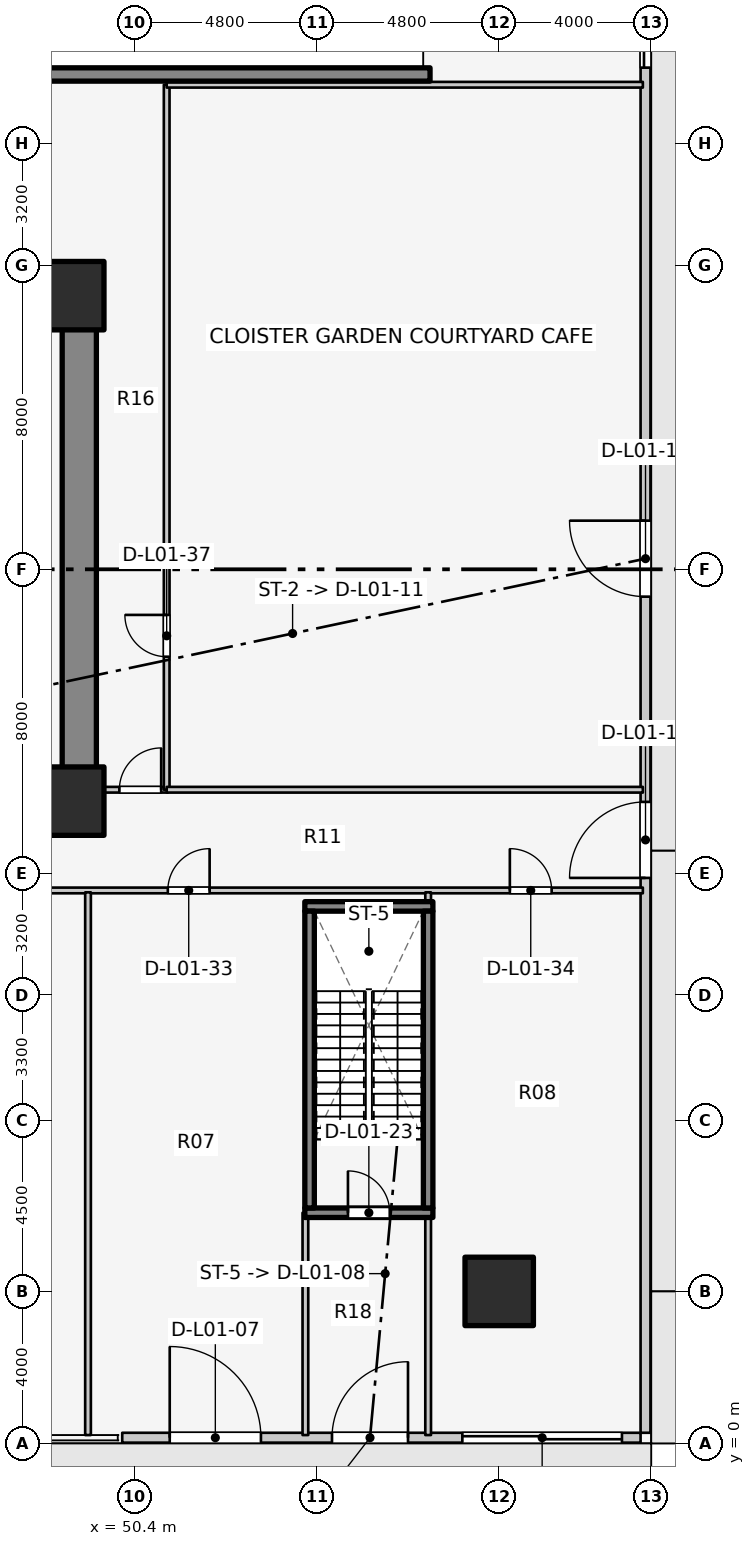
"""IFC4 building model, lengths in metres.
Left out: names, types, materials, properties, quantities, classifications, styles, units other than length and angle.
Written with IfcOpenShell. Run it as: python <this file> out.ifc"""

import sys

from ifc_helpers import new_model, si_unit, direction, frame, frame_2d, origin, origin_2d, place, context, subcontext, project, spatial, rectangle, extrude, element, fill, save


model = new_model("IFC4")
c1 = context("Model", 3, precision=1e-05, world=origin(), true_north=direction((0.0, 1.0)))
c2 = subcontext(c1, "Body", "Model", "MODEL_VIEW")
j1 = project(units=[si_unit("LENGTHUNIT", "METRE"), si_unit("PLANEANGLEUNIT", "RADIAN")], contexts=[c1])
p1 = place(None, origin())
s1 = spatial("IfcSite", under=j1, at=p1, CompositionType="ELEMENT")
p2 = place(p1, origin())
s2 = spatial("IfcBuilding", under=s1, at=p2, CompositionType="ELEMENT")
p3 = place(p2, origin())
s3 = spatial("IfcBuildingStorey", under=s2, at=p3, CompositionType="ELEMENT", Elevation=0.0)
p4 = place(p3, frame((48.95, 17.05, 0.0), z_axis=(0.0, 0.0, 1.0), x_axis=(0.0, 1.0, 0.0)))
e1 = element("IfcWall", 1, at=p4, inside=s3, PredefinedType="SHEAR", context=c2, shape_type="SweptSolid", body=[
    extrude(rectangle(XDim=12.8, YDim=0.9, at=frame_2d((6.4, 0.0))), origin(), (0.0, 0.0, 1.0), 4.6),
])
p5 = place(p3, frame((54.885, 6.07, 0.0), z_axis=(0.0, 0.0, 1.0), x_axis=(1.0, 0.0, 0.0)))
e2 = element("IfcWall", 2, at=p5, inside=s3, PredefinedType="SOLIDWALL", context=c2, shape_type="SweptSolid", body=[
    extrude(rectangle(XDim=3.37, YDim=0.25, at=frame_2d((1.685, 0.0))), origin(), (0.0, 0.0, 1.0), 4.6),
])
p6 = place(p5, frame((1.135, 0.0, 0.0)))
e3 = element("IfcOpeningElement", 3, at=p6, cuts=e2, PredefinedType="OPENING", context=c2, shape_type="SweptSolid", body=[
    extrude(rectangle(XDim=1.1, YDim=2.1, at=frame_2d((0.55, 1.05))), frame((0.0, 0.135, 0.0), z_axis=(0.0, -1.0, 0.0), x_axis=(1.0, 0.0, 0.0)), (0.0, 0.0, 1.0), 0.27),
])
p7 = place(p3, frame((54.885, 14.13, 0.0), z_axis=(0.0, 0.0, 1.0), x_axis=(1.0, 0.0, 0.0)))
e4 = element("IfcWall", 4, at=p7, inside=s3, PredefinedType="SOLIDWALL", context=c2, shape_type="SweptSolid", body=[
    extrude(rectangle(XDim=3.37, YDim=0.25, at=frame_2d((1.685, 0.0))), origin(), (0.0, 0.0, 1.0), 4.6),
])
for number, where, z_axis, x_axis in (
    (5, (55.01, 6.195, 0.0), (0.0, 0.0, 1.0), (0.0, 1.0, 0.0)),
    (6, (58.13, 6.195, 0.0), (0.0, 0.0, 1.0), (0.0, 1.0, 0.0)),
):
    element("IfcWall", number, at=place(p3, frame(where, z_axis=z_axis, x_axis=x_axis)), inside=s3, PredefinedType="SOLIDWALL", context=c2, shape_type="SweptSolid", body=[
        extrude(rectangle(XDim=7.81, YDim=0.25, at=frame_2d((3.905, 0.0))), origin(), (0.0, 0.0, 1.0), 4.6),
    ])
p8 = place(p3, frame((13.65, 36.02, 0.0), z_axis=(0.0, 0.0, 1.0), x_axis=(1.0, 0.0, 0.0)))
e7 = element("IfcWall", 7, at=p8, inside=s3, PredefinedType="SOLIDWALL", context=c2, shape_type="SweptSolid", body=[
    extrude(rectangle(XDim=44.53, YDim=0.35, at=frame_2d((22.265, 0.0))), origin(), (0.0, 0.0, 1.0), 4.6),
])
for number, where, z_axis, x_axis in (
    (8, (48.7, 16.9, 0.0), (0.0, 0.0, 1.0), (1.0, 0.0, 0.0)),
    (9, (48.7, 30.2, 0.0), (0.0, 0.0, 1.0), (1.0, 0.0, 0.0)),
    (10, (60.0, 4.0, 0.0), (0.0, 0.0, 1.0), (1.0, 0.0, 0.0)),
):
    element("IfcColumn", number, at=place(p3, frame(where, z_axis=z_axis, x_axis=x_axis)), inside=s3, PredefinedType="COLUMN", context=c2, shape_type="SweptSolid", body=[
        extrude(rectangle(XDim=1.8, YDim=1.8, at=origin_2d()), origin(), (0.0, 0.0, 1.0), 4.6),
    ])
p9 = place(p3, frame((50.08, 0.15, 0.0), z_axis=(0.0, 0.0, 1.0), x_axis=(1.0, 0.0, 0.0)))
e11 = element("IfcWall", 11, at=p9, inside=s3, PredefinedType="STANDARD", context=c2, shape_type="SweptSolid", body=[
    extrude(rectangle(XDim=13.64, YDim=0.26, at=frame_2d((6.82, 0.0))), origin(), (0.0, 0.0, 1.0), 4.28),
])
p10 = place(p9, frame((1.25, 0.0, 0.0)))
e12 = element("IfcOpeningElement", 12, at=p10, cuts=e11, PredefinedType="OPENING", context=c2, shape_type="SweptSolid", body=[
    extrude(rectangle(XDim=2.4, YDim=2.6, at=frame_2d((1.2, 1.3))), frame((0.0, 0.14, 0.0), z_axis=(0.0, -1.0, 0.0), x_axis=(1.0, 0.0, 0.0)), (0.0, 0.0, 1.0), 0.28),
])
p11 = place(p9, frame((5.52, 0.0, 0.0)))
e13 = element("IfcOpeningElement", 13, at=p11, cuts=e11, PredefinedType="OPENING", context=c2, shape_type="SweptSolid", body=[
    extrude(rectangle(XDim=2.0, YDim=2.4, at=frame_2d((1.0, 1.2))), frame((0.0, 0.14, 0.0), z_axis=(0.0, -1.0, 0.0), x_axis=(1.0, 0.0, 0.0)), (0.0, 0.0, 1.0), 0.28),
])
p12 = place(p9, frame((8.95, 0.0, 0.0)))
e14 = element("IfcOpeningElement", 14, at=p12, cuts=e11, PredefinedType="OPENING", context=c2, shape_type="SweptSolid", body=[
    extrude(rectangle(XDim=4.2, YDim=3.0, at=frame_2d((2.1, 1.5))), frame((0.0, 0.14, 0.0), z_axis=(0.0, -1.0, 0.0), x_axis=(1.0, 0.0, 0.0)), (0.0, 0.0, 1.0), 0.28),
])
p13 = place(p3, frame((63.85, 0.28, 0.0), z_axis=(0.0, 0.0, 1.0), x_axis=(0.0, 1.0, 0.0)))
e15 = element("IfcWall", 15, at=p13, inside=s3, PredefinedType="STANDARD", context=c2, shape_type="SweptSolid", body=[
    extrude(rectangle(XDim=45.44, YDim=0.26, at=frame_2d((22.72, 0.0))), origin(), (0.0, 0.0, 1.0), 4.28),
])
p14 = place(p13, frame((14.6, 0.0, 0.0)))
e16 = element("IfcOpeningElement", 16, at=p14, cuts=e15, PredefinedType="OPENING", context=c2, shape_type="SweptSolid", body=[
    extrude(rectangle(XDim=2.0, YDim=2.4, at=frame_2d((1.0, 1.2))), frame((0.0, 0.14, 0.0), z_axis=(0.0, -1.0, 0.0), x_axis=(1.0, 0.0, 0.0)), (0.0, 0.0, 1.0), 0.28),
])
p15 = place(p13, frame((22.0, 0.0, 0.0)))
e17 = element("IfcOpeningElement", 17, at=p15, cuts=e15, PredefinedType="OPENING", context=c2, shape_type="SweptSolid", body=[
    extrude(rectangle(XDim=2.0, YDim=2.4, at=frame_2d((1.0, 1.2))), frame((0.0, 0.14, 0.0), z_axis=(0.0, -1.0, 0.0), x_axis=(1.0, 0.0, 0.0)), (0.0, 0.0, 1.0), 0.28),
])
p16 = place(p13, frame((35.92, 0.0, 0.0)))
e18 = element("IfcOpeningElement", 18, at=p16, cuts=e15, PredefinedType="OPENING", context=c2, shape_type="SweptSolid", body=[
    extrude(rectangle(XDim=4.2, YDim=3.0, at=frame_2d((2.1, 1.5))), frame((0.0, 0.14, 0.0), z_axis=(0.0, -1.0, 0.0), x_axis=(1.0, 0.0, 0.0)), (0.0, 0.0, 1.0), 0.28),
])
p17 = place(p3, frame((44.43, 14.55, 0.0), z_axis=(0.0, 0.0, 1.0), x_axis=(1.0, 0.0, 0.0)))
e19 = element("IfcWall", 19, at=p17, inside=s3, PredefinedType="PARTITIONING", context=c2, shape_type="SweptSolid", body=[
    extrude(rectangle(XDim=19.35, YDim=0.15, at=frame_2d((9.675, 0.0))), origin(), (0.0, 0.0, 1.0), 3.3),
])
p18 = place(p17, frame((1.45, 0.0, 0.0)))
e20 = element("IfcOpeningElement", 20, at=p18, cuts=e19, PredefinedType="OPENING", context=c2, shape_type="SweptSolid", body=[
    extrude(rectangle(XDim=1.1, YDim=2.1, at=frame_2d((0.55, 1.05))), frame((0.0, 0.085, 0.0), z_axis=(0.0, -1.0, 0.0), x_axis=(1.0, 0.0, 0.0)), (0.0, 0.0, 1.0), 0.17),
])
p19 = place(p17, frame((6.85, 0.0, 0.0)))
e21 = element("IfcOpeningElement", 21, at=p19, cuts=e19, PredefinedType="OPENING", context=c2, shape_type="SweptSolid", body=[
    extrude(rectangle(XDim=1.1, YDim=2.1, at=frame_2d((0.55, 1.05))), frame((0.0, 0.085, 0.0), z_axis=(0.0, -1.0, 0.0), x_axis=(1.0, 0.0, 0.0)), (0.0, 0.0, 1.0), 0.17),
])
p20 = place(p17, frame((15.85, 0.0, 0.0)))
e22 = element("IfcOpeningElement", 22, at=p20, cuts=e19, PredefinedType="OPENING", context=c2, shape_type="SweptSolid", body=[
    extrude(rectangle(XDim=1.1, YDim=2.1, at=frame_2d((0.55, 1.05))), frame((0.0, 0.085, 0.0), z_axis=(0.0, -1.0, 0.0), x_axis=(1.0, 0.0, 0.0)), (0.0, 0.0, 1.0), 0.17),
])
p21 = place(p3, frame((48.95, 17.2, 0.0), z_axis=(0.0, 0.0, 1.0), x_axis=(1.0, 0.0, 0.0)))
e23 = element("IfcWall", 23, at=p21, inside=s3, PredefinedType="PARTITIONING", context=c2, shape_type="SweptSolid", body=[
    extrude(rectangle(XDim=2.33, YDim=0.15, at=frame_2d((1.165, 0.0))), origin(), (0.0, 0.0, 1.0), 4.255),
])
p22 = place(p21, frame((1.055, 0.0, 0.0)))
e24 = element("IfcOpeningElement", 24, at=p22, cuts=e23, PredefinedType="OPENING", context=c2, shape_type="SweptSolid", body=[
    extrude(rectangle(XDim=1.1, YDim=2.1, at=frame_2d((0.55, 1.05))), frame((0.0, 0.085, 0.0), z_axis=(0.0, -1.0, 0.0), x_axis=(1.0, 0.0, 0.0)), (0.0, 0.0, 1.0), 0.17),
])
p23 = place(p3, frame((49.18, 0.22, 0.0), z_axis=(0.0, 0.0, 1.0), x_axis=(0.0, 1.0, 0.0)))
e25 = element("IfcWall", 25, at=p23, inside=s3, PredefinedType="PARTITIONING", context=c2, shape_type="SweptSolid", body=[
    extrude(rectangle(XDim=14.28, YDim=0.15, at=frame_2d((7.14, 0.0))), origin(), (0.0, 0.0, 1.0), 3.3),
])
p24 = place(p3, frame((54.9, 0.22, 0.0), z_axis=(0.0, 0.0, 1.0), x_axis=(0.0, 1.0, 0.0)))
e26 = element("IfcWall", 26, at=p24, inside=s3, PredefinedType="PARTITIONING", context=c2, shape_type="SweptSolid", body=[
    extrude(rectangle(XDim=5.85, YDim=0.15, at=frame_2d((2.925, 0.0))), origin(), (0.0, 0.0, 1.0), 3.3),
])
p25 = place(p3, frame((58.13, 0.22, 0.0), z_axis=(0.0, 0.0, 1.0), x_axis=(0.0, 1.0, 0.0)))
e27 = element("IfcWall", 27, at=p25, inside=s3, PredefinedType="PARTITIONING", context=c2, shape_type="SweptSolid", body=[
    extrude(rectangle(XDim=5.74, YDim=0.15, at=frame_2d((2.87, 0.0))), origin(), (0.0, 0.0, 1.0), 3.3),
])
p26 = place(p3, frame((58.13, 14.24, 0.0), z_axis=(0.0, 0.0, 1.0), x_axis=(0.0, 1.0, 0.0)))
e28 = element("IfcWall", 28, at=p26, inside=s3, PredefinedType="PARTITIONING", context=c2, shape_type="SweptSolid", body=[
    extrude(rectangle(XDim=0.26, YDim=0.15, at=frame_2d((0.13, 0.0))), origin(), (0.0, 0.0, 1.0), 4.255),
])
p27 = place(p3, frame((51.25, 17.2, 0.0), z_axis=(0.0, 0.0, 1.0), x_axis=(0.0, 1.0, 0.0)))
e29 = element("IfcWall", 29, at=p27, inside=s3, PredefinedType="PARTITIONING", context=c2, shape_type="SweptSolid", body=[
    extrude(rectangle(XDim=18.55, YDim=0.15, at=frame_2d((9.275, 0.0))), origin(), (0.0, 0.0, 1.0), 3.3),
])
p28 = place(p27, frame((3.5, 0.0, 0.0)))
e30 = element("IfcOpeningElement", 30, at=p28, cuts=e29, PredefinedType="OPENING", context=c2, shape_type="SweptSolid", body=[
    extrude(rectangle(XDim=1.1, YDim=2.1, at=frame_2d((0.55, 1.05))), frame((0.0, 0.085, 0.0), z_axis=(0.0, -1.0, 0.0), x_axis=(1.0, 0.0, 0.0)), (0.0, 0.0, 1.0), 0.17),
])
for number, where, z_axis, x_axis in (
    (31, (51.25, 17.2, 0.0), (0.0, 0.0, 1.0), (1.0, 0.0, 0.0)),
    (32, (51.25, 35.75, 0.0), (0.0, 0.0, 1.0), (1.0, 0.0, 0.0)),
):
    element("IfcWall", number, at=place(p3, frame(where, z_axis=z_axis, x_axis=x_axis)), inside=s3, PredefinedType="PARTITIONING", context=c2, shape_type="SweptSolid", body=[
        extrude(rectangle(XDim=12.53, YDim=0.15, at=frame_2d((6.265, 0.0))), origin(), (0.0, 0.0, 1.0), 3.3),
    ])
p29 = place(p10, frame((2.4, 0.0, 0.0), z_axis=(0.0, 0.0, 1.0), x_axis=(-1.0, 0.0, 0.0)))
e33 = element("IfcDoor", 33, at=p29, inside=s3, OperationType="SINGLE_SWING_LEFT", PredefinedType="DOOR", context=c2, shape_type="SweptSolid", body=[
    extrude(rectangle(XDim=2.4, YDim=2.6, at=frame_2d((1.2, 1.3))), frame((0.0, 0.025, 0.0), z_axis=(0.0, -1.0, 0.0), x_axis=(1.0, 0.0, 0.0)), (0.0, 0.0, 1.0), 0.05),
])
fill(e12, e33)
p30 = place(p11, frame((2.0, 0.0, 0.0), z_axis=(0.0, 0.0, 1.0), x_axis=(-1.0, 0.0, 0.0)))
e34 = element("IfcDoor", 34, at=p30, inside=s3, OperationType="SINGLE_SWING_RIGHT", PredefinedType="DOOR", context=c2, shape_type="SweptSolid", body=[
    extrude(rectangle(XDim=2.0, YDim=2.4, at=frame_2d((1.0, 1.2))), frame((0.0, 0.025, 0.0), z_axis=(0.0, -1.0, 0.0), x_axis=(1.0, 0.0, 0.0)), (0.0, 0.0, 1.0), 0.05),
])
fill(e13, e34)
p31 = place(p12, origin())
e35 = element("IfcDoor", 35, at=p31, inside=s3, OperationType="SLIDING_TO_LEFT", PredefinedType="GATE", context=c2, shape_type="SweptSolid", body=[
    extrude(rectangle(XDim=4.2, YDim=3.0, at=frame_2d((2.1, 1.5))), frame((0.0, 0.025, 0.0), z_axis=(0.0, -1.0, 0.0), x_axis=(1.0, 0.0, 0.0)), (0.0, 0.0, 1.0), 0.05),
])
fill(e14, e35)
p32 = place(p14, frame((2.0, 0.0, 0.0), z_axis=(0.0, 0.0, 1.0), x_axis=(-1.0, 0.0, 0.0)))
e36 = element("IfcDoor", 36, at=p32, inside=s3, OperationType="SINGLE_SWING_LEFT", PredefinedType="DOOR", context=c2, shape_type="SweptSolid", body=[
    extrude(rectangle(XDim=2.0, YDim=2.4, at=frame_2d((1.0, 1.2))), frame((0.0, 0.025, 0.0), z_axis=(0.0, -1.0, 0.0), x_axis=(1.0, 0.0, 0.0)), (0.0, 0.0, 1.0), 0.05),
])
fill(e16, e36)
p33 = place(p15, frame((2.0, 0.0, 0.0), z_axis=(0.0, 0.0, 1.0), x_axis=(-1.0, 0.0, 0.0)))
e37 = element("IfcDoor", 37, at=p33, inside=s3, OperationType="SINGLE_SWING_RIGHT", PredefinedType="DOOR", context=c2, shape_type="SweptSolid", body=[
    extrude(rectangle(XDim=2.0, YDim=2.4, at=frame_2d((1.0, 1.2))), frame((0.0, 0.025, 0.0), z_axis=(0.0, -1.0, 0.0), x_axis=(1.0, 0.0, 0.0)), (0.0, 0.0, 1.0), 0.05),
])
fill(e17, e37)
p34 = place(p16, origin())
e38 = element("IfcDoor", 38, at=p34, inside=s3, OperationType="SLIDING_TO_LEFT", PredefinedType="GATE", context=c2, shape_type="SweptSolid", body=[
    extrude(rectangle(XDim=4.2, YDim=3.0, at=frame_2d((2.1, 1.5))), frame((0.0, 0.025, 0.0), z_axis=(0.0, -1.0, 0.0), x_axis=(1.0, 0.0, 0.0)), (0.0, 0.0, 1.0), 0.05),
])
fill(e18, e38)
p35 = place(p6, origin())
e39 = element("IfcDoor", 39, at=p35, inside=s3, OperationType="SINGLE_SWING_LEFT", PredefinedType="DOOR", context=c2, shape_type="SweptSolid", body=[
    extrude(rectangle(XDim=1.1, YDim=2.1, at=frame_2d((0.55, 1.05))), frame((0.0, 0.025, 0.0), z_axis=(0.0, -1.0, 0.0), x_axis=(1.0, 0.0, 0.0)), (0.0, 0.0, 1.0), 0.05),
])
fill(e3, e39)
p36 = place(p19, origin())
e40 = element("IfcDoor", 40, at=p36, inside=s3, OperationType="SINGLE_SWING_RIGHT", PredefinedType="DOOR", context=c2, shape_type="SweptSolid", body=[
    extrude(rectangle(XDim=1.1, YDim=2.1, at=frame_2d((0.55, 1.05))), frame((0.0, 0.025, 0.0), z_axis=(0.0, -1.0, 0.0), x_axis=(1.0, 0.0, 0.0)), (0.0, 0.0, 1.0), 0.05),
])
fill(e21, e40)
p37 = place(p20, origin())
e41 = element("IfcDoor", 41, at=p37, inside=s3, OperationType="SINGLE_SWING_LEFT", PredefinedType="DOOR", context=c2, shape_type="SweptSolid", body=[
    extrude(rectangle(XDim=1.1, YDim=2.1, at=frame_2d((0.55, 1.05))), frame((0.0, 0.025, 0.0), z_axis=(0.0, -1.0, 0.0), x_axis=(1.0, 0.0, 0.0)), (0.0, 0.0, 1.0), 0.05),
])
fill(e22, e41)
p38 = place(p22, origin())
e42 = element("IfcDoor", 42, at=p38, inside=s3, OperationType="SINGLE_SWING_RIGHT", PredefinedType="DOOR", context=c2, shape_type="SweptSolid", body=[
    extrude(rectangle(XDim=1.1, YDim=2.1, at=frame_2d((0.55, 1.05))), frame((0.0, 0.025, 0.0), z_axis=(0.0, -1.0, 0.0), x_axis=(1.0, 0.0, 0.0)), (0.0, 0.0, 1.0), 0.05),
])
fill(e24, e42)
p39 = place(p28, origin())
e43 = element("IfcDoor", 43, at=p39, inside=s3, OperationType="SINGLE_SWING_RIGHT", PredefinedType="DOOR", context=c2, shape_type="SweptSolid", body=[
    extrude(rectangle(XDim=1.1, YDim=2.1, at=frame_2d((0.55, 1.05))), frame((0.0, 0.025, 0.0), z_axis=(0.0, -1.0, 0.0), x_axis=(1.0, 0.0, 0.0)), (0.0, 0.0, 1.0), 0.05),
])
fill(e30, e43)
save(model, sys.argv[1])
